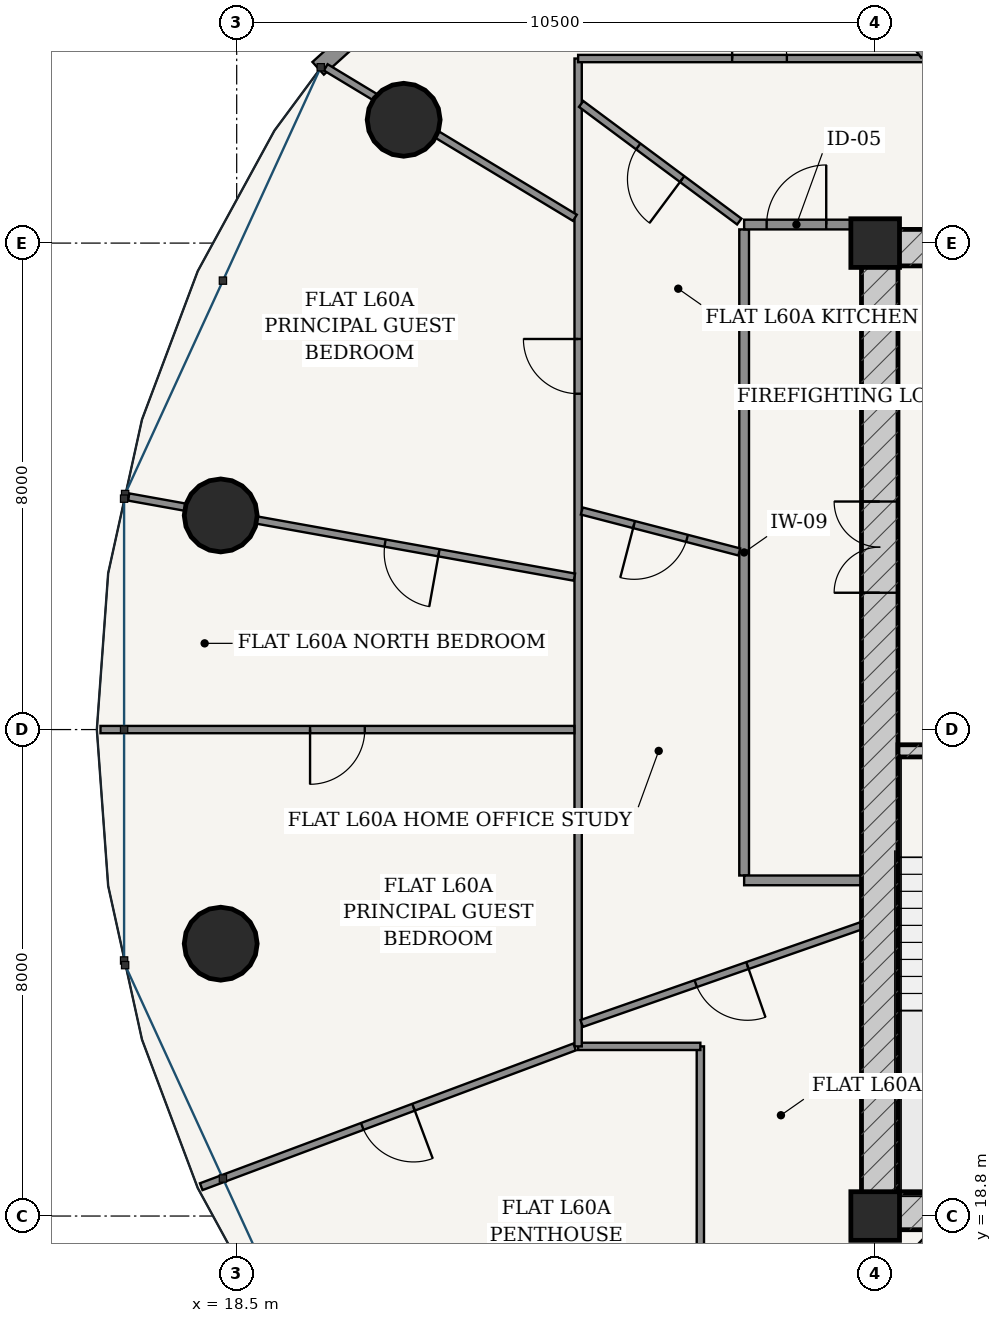
"""IFC4 building model, lengths in metres.
Left out: names, types, materials, properties, quantities, classifications, styles, units other than length and angle.
Written with IfcOpenShell. Run it as: python <this file> out.ifc"""

import sys

from ifc_helpers import new_model, si_unit, direction, frame, frame_2d, origin, origin_2d, place, context, subcontext, project, spatial, rectangle, hollow_circle, extrude, source, transform, mapped, element, fill, save


model = new_model("IFC4")
c1 = context("Model", 3, precision=1e-05, world=origin(), true_north=direction((-0.2419218956, 0.970295726276)))
c2 = subcontext(c1, "Body", "Model", "MODEL_VIEW")
j1 = project(units=[si_unit("LENGTHUNIT", "METRE"), si_unit("PLANEANGLEUNIT", "RADIAN")], contexts=[c1])
p1 = place(None, origin())
s1 = spatial("IfcSite", under=j1, at=p1, CompositionType="ELEMENT")
p2 = place(p1, origin())
s2 = spatial("IfcBuilding", under=s1, at=p2, CompositionType="ELEMENT")
p3 = place(p2, frame((0.0, 0.0, 228.2)))
s3 = spatial("IfcBuildingStorey", under=s2, at=p3, CompositionType="ELEMENT", Elevation=228.2)
for number, where, z_axis, x_axis in (
    (1, (29.0, 18.8, 0.0), (0.0, 0.0, 1.0), (1.0, 0.0, 0.0)),
    (2, (29.0, 34.8, 0.0), (0.0, 0.0, 1.0), (1.0, 0.0, 0.0)),
):
    element("IfcColumn", number, at=place(p3, frame(where, z_axis=z_axis, x_axis=x_axis)), inside=s3, PredefinedType="COLUMN", context=c2, shape_type="SweptSolid", body=[
        extrude(rectangle(XDim=0.8, YDim=0.8, at=origin_2d()), origin(), (0.0, 0.0, 1.0), 3.7),
    ])
p4 = place(p3, frame((28.775, 18.875, 0.0), z_axis=(0.0, 0.0, 1.0), x_axis=(1.0, 0.0, 0.0)))
e3 = element("IfcWall", 3, at=p4, inside=s3, PredefinedType="SHEAR", context=c2, shape_type="SweptSolid", body=[
    extrude(rectangle(XDim=18.45, YDim=0.6, at=frame_2d((9.225, 0.0))), origin(), (0.0, 0.0, 1.0), 3.435),
])
p5 = place(p4, frame((8.8, 0.0, 0.0)))
e4 = element("IfcOpeningElement", 4, at=p5, cuts=e3, PredefinedType="OPENING", context=c2, shape_type="SweptSolid", body=[
    extrude(rectangle(XDim=0.85, YDim=2.1, at=frame_2d((0.425, 1.05))), frame((0.0, 0.31, 0.0), z_axis=(0.0, -1.0, 0.0), x_axis=(1.0, 0.0, 0.0)), (0.0, 0.0, 1.0), 0.62),
])
p6 = place(p3, frame((28.775, 34.725, 0.0), z_axis=(0.0, 0.0, 1.0), x_axis=(1.0, 0.0, 0.0)))
e5 = element("IfcWall", 5, at=p6, inside=s3, PredefinedType="SHEAR", context=c2, shape_type="SweptSolid", body=[
    extrude(rectangle(XDim=18.45, YDim=0.6, at=frame_2d((9.225, 0.0))), origin(), (0.0, 0.0, 1.0), 3.435),
])
p7 = place(p3, frame((29.075, 19.175, 0.0), z_axis=(0.0, 0.0, 1.0), x_axis=(0.0, 1.0, 0.0)))
e6 = element("IfcWall", 6, at=p7, inside=s3, PredefinedType="SHEAR", context=c2, shape_type="SweptSolid", body=[
    extrude(rectangle(XDim=15.25, YDim=0.6, at=frame_2d((7.625, 0.0))), origin(), (0.0, 0.0, 1.0), 3.435),
])
p8 = place(p7, frame((9.875, 0.0, 0.0)))
e7 = element("IfcOpeningElement", 7, at=p8, cuts=e6, PredefinedType="OPENING", context=c2, shape_type="SweptSolid", body=[
    extrude(rectangle(XDim=1.5, YDim=2.2, at=frame_2d((0.75, 1.1))), frame((0.0, 0.31, 0.0), z_axis=(0.0, -1.0, 0.0), x_axis=(1.0, 0.0, 0.0)), (0.0, 0.0, 1.0), 0.62),
])
p9 = place(p3, frame((29.375, 26.45, 0.0), z_axis=(0.0, 0.0, 1.0), x_axis=(1.0, 0.0, 0.0)))
e8 = element("IfcWall", 8, at=p9, inside=s3, PredefinedType="SOLIDWALL", context=c2, shape_type="SweptSolid", body=[
    extrude(rectangle(XDim=3.32, YDim=0.2, at=frame_2d((1.66, 0.0))), origin(), (0.0, 0.0, 1.0), 3.435),
])
p10 = place(p9, frame((1.185, 0.0, 0.0)))
e9 = element("IfcOpeningElement", 9, at=p10, cuts=e8, PredefinedType="OPENING", context=c2, shape_type="SweptSolid", body=[
    extrude(rectangle(XDim=0.95, YDim=2.15, at=frame_2d((0.475, 1.075))), frame((0.0, 0.11, 0.0), z_axis=(0.0, -1.0, 0.0), x_axis=(1.0, 0.0, 0.0)), (0.0, 0.0, 1.0), 0.22),
])
for number, where, z_axis, x_axis in (
    (10, (21.246, 36.828, 0.0), (0.0, 0.0, 1.0), (1.0, 0.0, 0.0)),
    (11, (18.237, 30.321, 0.0), (0.0, 0.0, 1.0), (1.0, 0.0, 0.0)),
    (12, (18.237, 23.279, 0.0), (0.0, 0.0, 1.0), (1.0, 0.0, 0.0)),
):
    element("IfcColumn", number, at=place(p3, frame(where, z_axis=z_axis, x_axis=x_axis)), inside=s3, PredefinedType="COLUMN", context=c2, shape_type="SweptSolid", body=[
        extrude(hollow_circle(Radius=0.6, WallThickness=0.038, at=origin_2d()), origin(), (0.0, 0.0, 1.0), 3.7),
    ])
p11 = place(p3, frame((25.965, 43.209, 0.0), z_axis=(0.0, 0.0, 1.0), x_axis=(-0.741972126783, -0.670430729514, 0.0)))
e13 = element("IfcWall", 13, at=p11, inside=s3, PredefinedType="SOLIDWALL", context=c2, shape_type="SweptSolid", body=[
    extrude(rectangle(XDim=8.255, YDim=0.28, at=frame_2d((4.127, 0.0))), origin(), (0.0, 0.0, 1.0), 3.435),
])
p12 = place(p11, frame((1.179, 0.0, 0.85)))
e14 = element("IfcOpeningElement", 14, at=p12, cuts=e13, PredefinedType="OPENING", context=c2, shape_type="SweptSolid", body=[
    extrude(rectangle(XDim=2.1, YDim=1.95, at=frame_2d((1.05, 0.975))), frame((0.0, 0.15, 0.0), z_axis=(0.0, -1.0, 0.0), x_axis=(1.0, 0.0, 0.0)), (0.0, 0.0, 1.0), 0.3),
])
p13 = place(p11, frame((4.976, 0.0, 0.85)))
e15 = element("IfcOpeningElement", 15, at=p13, cuts=e13, PredefinedType="OPENING", context=c2, shape_type="SweptSolid", body=[
    extrude(rectangle(XDim=2.1, YDim=1.95, at=frame_2d((1.05, 0.975))), frame((0.0, 0.15, 0.0), z_axis=(0.0, -1.0, 0.0), x_axis=(1.0, 0.0, 0.0)), (0.0, 0.0, 1.0), 0.3),
])
p14 = place(p3, frame((26.845, 24.4, 0.0), z_axis=(0.0, 0.0, 1.0), x_axis=(0.0, 1.0, 0.0)))
e16 = element("IfcWall", 16, at=p14, inside=s3, PredefinedType="PARTITIONING", context=c2, shape_type="SweptSolid", body=[
    extrude(rectangle(XDim=10.625, YDim=0.16, at=frame_2d((5.312, 0.0))), origin(), (0.0, 0.0, 1.0), 2.951),
])
p15 = place(p3, frame((26.845, 35.105, 0.0), z_axis=(0.0, 0.0, 1.0), x_axis=(1.0, 0.0, 0.0)))
e17 = element("IfcWall", 17, at=p15, inside=s3, PredefinedType="PARTITIONING", context=c2, shape_type="SweptSolid", body=[
    extrude(rectangle(XDim=1.93, YDim=0.16, at=frame_2d((0.965, 0.0))), origin(), (0.0, 0.0, 1.0), 3.435),
])
p16 = place(p15, frame((0.37, 0.0, 0.0)))
e18 = element("IfcOpeningElement", 18, at=p16, cuts=e17, PredefinedType="OPENING", context=c2, shape_type="SweptSolid", body=[
    extrude(rectangle(XDim=0.98, YDim=2.2, at=frame_2d((0.49, 1.1))), frame((0.0, 0.09, 0.0), z_axis=(0.0, -1.0, 0.0), x_axis=(1.0, 0.0, 0.0)), (0.0, 0.0, 1.0), 0.18),
])
p17 = place(p3, frame((26.845, 24.32, 0.0), z_axis=(0.0, 0.0, 1.0), x_axis=(1.0, 0.0, 0.0)))
e19 = element("IfcWall", 19, at=p17, inside=s3, PredefinedType="PARTITIONING", context=c2, shape_type="SweptSolid", body=[
    extrude(rectangle(XDim=1.93, YDim=0.16, at=frame_2d((0.965, 0.0))), origin(), (0.0, 0.0, 1.0), 3.435),
])
p18 = place(p3, frame((26.125, 15.925, 0.0), z_axis=(0.0, 0.0, 1.0), x_axis=(0.0, 1.0, 0.0)))
e20 = element("IfcWall", 20, at=p18, inside=s3, PredefinedType="PARTITIONING", context=c2, shape_type="SweptSolid", body=[
    extrude(rectangle(XDim=5.665, YDim=0.12, at=frame_2d((2.833, 0.0))), origin(), (0.0, 0.0, 1.0), 2.951),
])
p19 = place(p3, frame((26.125, 21.59, 0.0), z_axis=(0.0, 0.0, 1.0), x_axis=(-1.0, 0.0, 0.0)))
e21 = element("IfcWall", 21, at=p19, inside=s3, PredefinedType="PARTITIONING", context=c2, shape_type="SweptSolid", body=[
    extrude(rectangle(XDim=2.01, YDim=0.12, at=frame_2d((1.005, 0.0))), origin(), (0.0, 0.0, 1.0), 3.11),
])
p20 = place(p3, frame((24.115, 21.59, 0.0), z_axis=(0.0, 0.0, 1.0), x_axis=(0.0, 1.0, 0.0)))
e22 = element("IfcWall", 22, at=p20, inside=s3, PredefinedType="PARTITIONING", context=c2, shape_type="SweptSolid", body=[
    extrude(rectangle(XDim=16.245, YDim=0.12, at=frame_2d((8.123, 0.0))), origin(), (0.0, 0.0, 1.0), 2.951),
])
p21 = place(p20, frame((10.733, 0.0, 0.0)))
e23 = element("IfcOpeningElement", 23, at=p21, cuts=e22, PredefinedType="OPENING", context=c2, shape_type="SweptSolid", body=[
    extrude(rectangle(XDim=0.9, YDim=2.15, at=frame_2d((0.45, 1.075))), frame((0.0, 0.07, 0.0), z_axis=(0.0, -1.0, 0.0), x_axis=(1.0, 0.0, 0.0)), (0.0, 0.0, 1.0), 0.14),
])
p22 = place(p3, frame((24.115, 37.835, 0.0), z_axis=(0.0, 0.0, 1.0), x_axis=(1.0, 0.0, 0.0)))
e24 = element("IfcWall", 24, at=p22, inside=s3, PredefinedType="PARTITIONING", context=c2, shape_type="SweptSolid", body=[
    extrude(rectangle(XDim=7.47, YDim=0.12, at=frame_2d((3.735, 0.0))), origin(), (0.0, 0.0, 1.0), 2.951),
])
p23 = place(p22, frame((2.533, 0.0, 0.0)))
e25 = element("IfcOpeningElement", 25, at=p23, cuts=e24, PredefinedType="OPENING", context=c2, shape_type="SweptSolid", body=[
    extrude(rectangle(XDim=0.9, YDim=2.15, at=frame_2d((0.45, 1.075))), frame((0.0, 0.07, 0.0), z_axis=(0.0, -1.0, 0.0), x_axis=(1.0, 0.0, 0.0)), (0.0, 0.0, 1.0), 0.14),
])
p24 = place(p3, frame((29.804, 37.885, 0.0), z_axis=(0.0, 0.0, 1.0), x_axis=(-0.594507557292, 0.804090022524, 0.0)))
e26 = element("IfcWall", 26, at=p24, inside=s3, PredefinedType="PARTITIONING", context=c2, shape_type="SweptSolid", body=[
    extrude(rectangle(XDim=6.481, YDim=0.12, at=frame_2d((3.241, 0.0))), origin(), (0.0, 0.0, 1.0), 2.951),
])
p25 = place(p3, frame((24.062, 35.216, 0.0), z_axis=(0.0, 0.0, 1.0), x_axis=(-0.856058483833, 0.516878972543, 0.0)))
e27 = element("IfcWall", 27, at=p25, inside=s3, PredefinedType="PARTITIONING", context=c2, shape_type="SweptSolid", body=[
    extrude(rectangle(XDim=4.787, YDim=0.12, at=frame_2d((2.393, 0.0))), origin(), (0.0, 0.0, 1.0), 2.951),
])
p26 = place(p3, frame((24.054, 29.307, 0.0), z_axis=(0.0, 0.0, 1.0), x_axis=(-0.984227185588, 0.176909149424, 0.0)))
e28 = element("IfcWall", 28, at=p26, inside=s3, PredefinedType="PARTITIONING", context=c2, shape_type="SweptSolid", body=[
    extrude(rectangle(XDim=7.448, YDim=0.12, at=frame_2d((3.724, 0.0))), origin(), (0.0, 0.0, 1.0), 2.951),
])
p27 = place(p26, frame((2.264, 0.0, 0.0)))
e29 = element("IfcOpeningElement", 29, at=p27, cuts=e28, PredefinedType="OPENING", context=c2, shape_type="SweptSolid", body=[
    extrude(rectangle(XDim=0.9, YDim=2.15, at=frame_2d((0.45, 1.075))), frame((0.0, 0.07, 0.0), z_axis=(0.0, -1.0, 0.0), x_axis=(1.0, 0.0, 0.0)), (0.0, 0.0, 1.0), 0.14),
])
p28 = place(p3, frame((24.053, 26.8, 0.0), z_axis=(0.0, 0.0, 1.0), x_axis=(-1.0, 0.0, 0.0)))
e30 = element("IfcWall", 30, at=p28, inside=s3, PredefinedType="PARTITIONING", context=c2, shape_type="SweptSolid", body=[
    extrude(rectangle(XDim=7.793, YDim=0.12, at=frame_2d((3.896, 0.0))), origin(), (0.0, 0.0, 1.0), 2.951),
])
p29 = place(p28, frame((3.447, 0.0, 0.0)))
e31 = element("IfcOpeningElement", 31, at=p29, cuts=e30, PredefinedType="OPENING", context=c2, shape_type="SweptSolid", body=[
    extrude(rectangle(XDim=0.9, YDim=2.15, at=frame_2d((0.45, 1.075))), frame((0.0, 0.07, 0.0), z_axis=(0.0, -1.0, 0.0), x_axis=(1.0, 0.0, 0.0)), (0.0, 0.0, 1.0), 0.14),
])
p30 = place(p3, frame((24.057, 21.581, 0.0), z_axis=(0.0, 0.0, 1.0), x_axis=(-0.936527968377, -0.350592875637, 0.0)))
e32 = element("IfcWall", 32, at=p30, inside=s3, PredefinedType="PARTITIONING", context=c2, shape_type="SweptSolid", body=[
    extrude(rectangle(XDim=6.556, YDim=0.12, at=frame_2d((3.278, 0.0))), origin(), (0.0, 0.0, 1.0), 2.951),
])
p31 = place(p30, frame((2.828, 0.0, 0.0)))
e33 = element("IfcOpeningElement", 33, at=p31, cuts=e32, PredefinedType="OPENING", context=c2, shape_type="SweptSolid", body=[
    extrude(rectangle(XDim=0.9, YDim=2.15, at=frame_2d((0.45, 1.075))), frame((0.0, 0.07, 0.0), z_axis=(0.0, -1.0, 0.0), x_axis=(1.0, 0.0, 0.0)), (0.0, 0.0, 1.0), 0.14),
])
p32 = place(p3, frame((26.765, 35.154, 0.0), z_axis=(0.0, 0.0, 1.0), x_axis=(-0.802434587752, 0.596740087793, 0.0)))
e34 = element("IfcWall", 34, at=p32, inside=s3, PredefinedType="PARTITIONING", context=c2, shape_type="SweptSolid", body=[
    extrude(rectangle(XDim=3.24, YDim=0.12, at=frame_2d((1.62, 0.0))), origin(), (0.0, 0.0, 1.0), 3.11),
])
p33 = place(p32, frame((1.17, 0.0, 0.0)))
e35 = element("IfcOpeningElement", 35, at=p33, cuts=e34, PredefinedType="OPENING", context=c2, shape_type="SweptSolid", body=[
    extrude(rectangle(XDim=0.9, YDim=2.15, at=frame_2d((0.45, 1.075))), frame((0.0, 0.07, 0.0), z_axis=(0.0, -1.0, 0.0), x_axis=(1.0, 0.0, 0.0)), (0.0, 0.0, 1.0), 0.14),
])
p34 = place(p3, frame((26.765, 29.721, 0.0), z_axis=(0.0, 0.0, 1.0), x_axis=(-0.967824284298, 0.251627015092, 0.0)))
e36 = element("IfcWall", 36, at=p34, inside=s3, PredefinedType="PARTITIONING", context=c2, shape_type="SweptSolid", body=[
    extrude(rectangle(XDim=2.676, YDim=0.12, at=frame_2d((1.338, 0.0))), origin(), (0.0, 0.0, 1.0), 3.435),
])
p35 = place(p34, frame((0.888, 0.0, 0.0)))
e37 = element("IfcOpeningElement", 37, at=p35, cuts=e36, PredefinedType="OPENING", context=c2, shape_type="SweptSolid", body=[
    extrude(rectangle(XDim=0.9, YDim=2.15, at=frame_2d((0.45, 1.075))), frame((0.0, 0.07, 0.0), z_axis=(0.0, -1.0, 0.0), x_axis=(1.0, 0.0, 0.0)), (0.0, 0.0, 1.0), 0.14),
])
p36 = place(p3, frame((28.775, 23.575, 0.0), z_axis=(0.0, 0.0, 1.0), x_axis=(-0.943974645063, -0.330017983569, 0.0)))
e38 = element("IfcWall", 38, at=p36, inside=s3, PredefinedType="PARTITIONING", context=c2, shape_type="SweptSolid", body=[
    extrude(rectangle(XDim=4.875, YDim=0.12, at=frame_2d((2.437, 0.0))), origin(), (0.0, 0.0, 1.0), 3.11),
])
p37 = place(p36, frame((1.987, 0.0, 0.0)))
e39 = element("IfcOpeningElement", 39, at=p37, cuts=e38, PredefinedType="OPENING", context=c2, shape_type="SweptSolid", body=[
    extrude(rectangle(XDim=0.9, YDim=2.15, at=frame_2d((0.45, 1.075))), frame((0.0, 0.07, 0.0), z_axis=(0.0, -1.0, 0.0), x_axis=(1.0, 0.0, 0.0)), (0.0, 0.0, 1.0), 0.14),
])
p38 = place(p3, frame((30.018, 18.575, 0.0), z_axis=(0.0, 0.0, 1.0), x_axis=(-0.696436677683, -0.717618250867, 0.0)))
e40 = element("IfcWall", 40, at=p38, inside=s3, PredefinedType="PARTITIONING", context=c2, shape_type="SweptSolid", body=[
    extrude(rectangle(XDim=3.631, YDim=0.12, at=frame_2d((1.815, 0.0))), origin(), (0.0, 0.0, 1.0), 2.951),
])
p39 = place(p38, frame((1.385, 0.0, 0.0)))
e41 = element("IfcOpeningElement", 41, at=p39, cuts=e40, PredefinedType="OPENING", context=c2, shape_type="SweptSolid", body=[
    extrude(rectangle(XDim=0.86, YDim=2.15, at=frame_2d((0.43, 1.075))), frame((0.0, 0.07, 0.0), z_axis=(0.0, -1.0, 0.0), x_axis=(1.0, 0.0, 0.0)), (0.0, 0.0, 1.0), 0.14),
])
m1 = source(origin(), c2, "Body", "SweptSolid", [
    extrude(rectangle(XDim=1.5, YDim=2.2, at=frame_2d((0.75, 1.1))), frame((0.0, 0.025, 0.0), z_axis=(0.0, -1.0, 0.0), x_axis=(1.0, 0.0, 0.0)), (0.0, 0.0, 1.0), 0.05),
])
p40 = place(p8, origin())
e42 = element("IfcDoor", 42, at=p40, inside=s3, OperationType="DOUBLE_DOOR_SINGLE_SWING", PredefinedType="DOOR", context=c2, shape_type="MappedRepresentation", body=[
    mapped(m1, transform((0.0, 0.0, 0.0), scale=1.0)),
])
fill(e7, e42)
m2 = source(origin(), c2, "Body", "SweptSolid", [
    extrude(rectangle(XDim=0.98, YDim=2.2, at=frame_2d((0.49, 1.1))), frame((0.0, 0.025, 0.0), z_axis=(0.0, -1.0, 0.0), x_axis=(1.0, 0.0, 0.0)), (0.0, 0.0, 1.0), 0.05),
])
p41 = place(p16, origin())
e43 = element("IfcDoor", 43, at=p41, inside=s3, OperationType="SINGLE_SWING_RIGHT", PredefinedType="DOOR", context=c2, shape_type="MappedRepresentation", body=[
    mapped(m2, transform((0.0, 0.0, 0.0), scale=1.0)),
])
fill(e18, e43)
m3 = source(origin(), c2, "Body", "SweptSolid", [
    extrude(rectangle(XDim=0.9, YDim=2.15, at=frame_2d((0.45, 1.075))), frame((0.0, 0.025, 0.0), z_axis=(0.0, -1.0, 0.0), x_axis=(1.0, 0.0, 0.0)), (0.0, 0.0, 1.0), 0.05),
])
p42 = place(p33, origin())
e44 = element("IfcDoor", 44, at=p42, inside=s3, OperationType="SINGLE_SWING_LEFT", PredefinedType="DOOR", context=c2, shape_type="MappedRepresentation", body=[
    mapped(m3, transform((0.0, 0.0, 0.0), scale=1.0)),
])
fill(e35, e44)
p43 = place(p35, origin())
e45 = element("IfcDoor", 45, at=p43, inside=s3, OperationType="SINGLE_SWING_RIGHT", PredefinedType="DOOR", context=c2, shape_type="MappedRepresentation", body=[
    mapped(m3, transform((0.0, 0.0, 0.0), scale=1.0)),
])
fill(e37, e45)
p44 = place(p37, origin())
e46 = element("IfcDoor", 46, at=p44, inside=s3, OperationType="SINGLE_SWING_LEFT", PredefinedType="DOOR", context=c2, shape_type="MappedRepresentation", body=[
    mapped(m3, transform((0.0, 0.0, 0.0), scale=1.0)),
])
fill(e39, e46)
p45 = place(p23, origin())
e47 = element("IfcDoor", 47, at=p45, inside=s3, OperationType="SINGLE_SWING_LEFT", PredefinedType="DOOR", context=c2, shape_type="MappedRepresentation", body=[
    mapped(m3, transform((0.0, 0.0, 0.0), scale=1.0)),
])
fill(e25, e47)
p46 = place(p21, origin())
e48 = element("IfcDoor", 48, at=p46, inside=s3, OperationType="SINGLE_SWING_RIGHT", PredefinedType="DOOR", context=c2, shape_type="MappedRepresentation", body=[
    mapped(m3, transform((0.0, 0.0, 0.0), scale=1.0)),
])
fill(e23, e48)
p47 = place(p27, origin())
e49 = element("IfcDoor", 49, at=p47, inside=s3, OperationType="SINGLE_SWING_LEFT", PredefinedType="DOOR", context=c2, shape_type="MappedRepresentation", body=[
    mapped(m3, transform((0.0, 0.0, 0.0), scale=1.0)),
])
fill(e29, e49)
p48 = place(p29, origin())
e50 = element("IfcDoor", 50, at=p48, inside=s3, OperationType="SINGLE_SWING_RIGHT", PredefinedType="DOOR", context=c2, shape_type="MappedRepresentation", body=[
    mapped(m3, transform((0.0, 0.0, 0.0), scale=1.0)),
])
fill(e31, e50)
p49 = place(p31, origin())
e51 = element("IfcDoor", 51, at=p49, inside=s3, OperationType="SINGLE_SWING_LEFT", PredefinedType="DOOR", context=c2, shape_type="MappedRepresentation", body=[
    mapped(m3, transform((0.0, 0.0, 0.0), scale=1.0)),
])
fill(e33, e51)
save(model, sys.argv[1])
